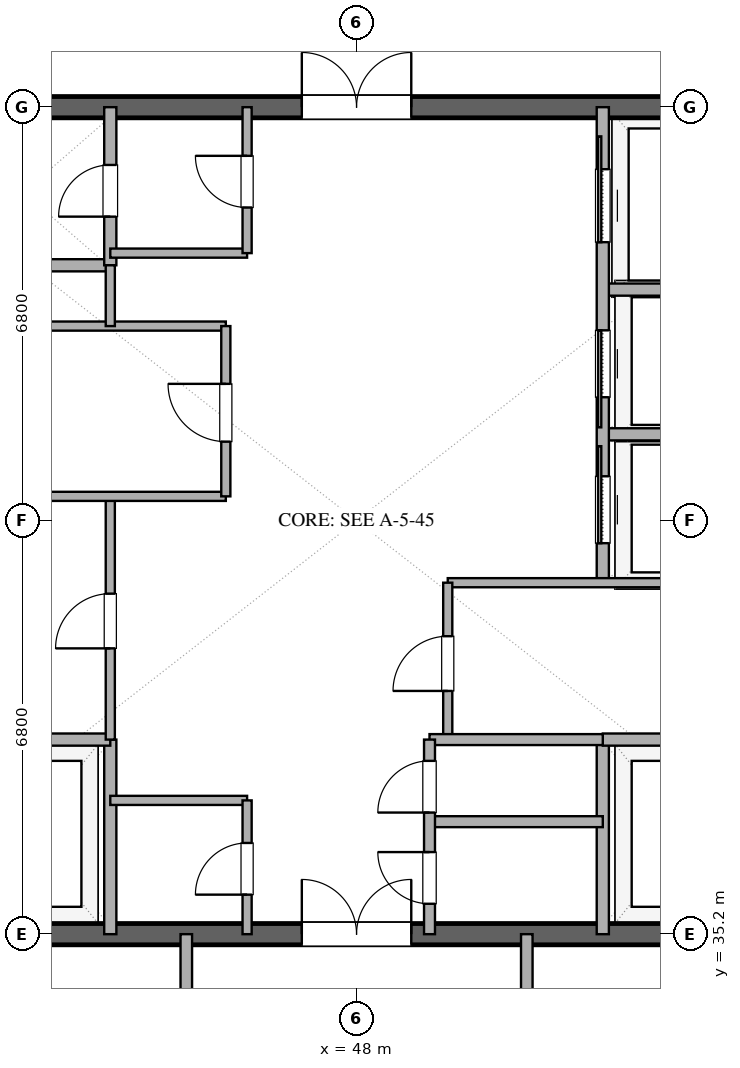
"""IFC4 building model, lengths in metres.
Left out: names, types, materials, properties, quantities, classifications, styles, units other than length and angle.
Written with IfcOpenShell. Run it as: python <this file> out.ifc"""

import sys

from ifc_helpers import new_model, si_unit, direction, frame, frame_2d, origin, place, context, subcontext, project, spatial, rectangle, extrude, element, fill, save


model = new_model("IFC4")
c1 = context("Model", 3, precision=1e-05, world=origin(), true_north=direction((0.0, 1.0)))
c2 = subcontext(c1, "Body", "Model", "MODEL_VIEW")
j1 = project(units=[si_unit("LENGTHUNIT", "METRE"), si_unit("PLANEANGLEUNIT", "RADIAN")], contexts=[c1])
p1 = place(None, origin())
s1 = spatial("IfcSite", under=j1, at=p1, CompositionType="ELEMENT")
p2 = place(p1, origin())
s2 = spatial("IfcBuilding", under=s1, at=p2, CompositionType="ELEMENT")
p3 = place(p2, frame((0.0, 0.0, 309.0)))
s3 = spatial("IfcBuildingStorey", under=s2, at=p3, CompositionType="ELEMENT", Elevation=309.0)
p4 = place(p3, frame((41.0, 35.2, 0.0), z_axis=(0.0, 0.0, 1.0), x_axis=(1.0, 0.0, 0.0)))
e1 = element("IfcWall", 1, at=p4, inside=s3, PredefinedType="SHEAR", context=c2, shape_type="SweptSolid", body=[
    extrude(rectangle(XDim=14.0, YDim=0.35, at=frame_2d((7.0, 0.0))), origin(), (0.0, 0.0, 1.0), 3.37),
])
p5 = place(p4, frame((6.1, 0.0, 0.0)))
e2 = element("IfcOpeningElement", 2, at=p5, cuts=e1, PredefinedType="OPENING", context=c2, shape_type="SweptSolid", body=[
    extrude(rectangle(XDim=1.8, YDim=2.25, at=frame_2d((0.9, 1.125))), frame((0.0, 0.185, 0.0), z_axis=(0.0, -1.0, 0.0), x_axis=(1.0, 0.0, 0.0)), (0.0, 0.0, 1.0), 0.37),
])
p6 = place(p3, frame((41.0, 48.8, 0.0), z_axis=(0.0, 0.0, 1.0), x_axis=(1.0, 0.0, 0.0)))
e3 = element("IfcWall", 3, at=p6, inside=s3, PredefinedType="SHEAR", context=c2, shape_type="SweptSolid", body=[
    extrude(rectangle(XDim=14.0, YDim=0.35, at=frame_2d((7.0, 0.0))), origin(), (0.0, 0.0, 1.0), 3.37),
])
p7 = place(p6, frame((6.1, 0.0, 0.0)))
e4 = element("IfcOpeningElement", 4, at=p7, cuts=e3, PredefinedType="OPENING", context=c2, shape_type="SweptSolid", body=[
    extrude(rectangle(XDim=1.8, YDim=2.25, at=frame_2d((0.9, 1.125))), frame((0.0, 0.185, 0.0), z_axis=(0.0, -1.0, 0.0), x_axis=(1.0, 0.0, 0.0)), (0.0, 0.0, 1.0), 0.37),
])
p8 = place(p3, frame((43.95, 35.2, 0.0), z_axis=(0.0, 0.0, 1.0), x_axis=(0.0, 1.0, 0.0)))
e5 = element("IfcWall", 5, at=p8, inside=s3, PredefinedType="SOLIDWALL", context=c2, shape_type="SweptSolid", body=[
    extrude(rectangle(XDim=3.2, YDim=0.2, at=frame_2d((1.6, 0.0))), origin(), (0.0, 0.0, 1.0), 2.73),
])
p9 = place(p3, frame((41.0, 38.4, 0.0), z_axis=(0.0, 0.0, 1.0), x_axis=(1.0, 0.0, 0.0)))
e6 = element("IfcWall", 6, at=p9, inside=s3, PredefinedType="SOLIDWALL", context=c2, shape_type="SweptSolid", body=[
    extrude(rectangle(XDim=2.95, YDim=0.2, at=frame_2d((1.475, 0.0))), origin(), (0.0, 0.0, 1.0), 2.73),
])
p10 = place(p3, frame((52.05, 35.2, 0.0), z_axis=(0.0, 0.0, 1.0), x_axis=(0.0, 1.0, 0.0)))
e7 = element("IfcWall", 7, at=p10, inside=s3, PredefinedType="SOLIDWALL", context=c2, shape_type="SweptSolid", body=[
    extrude(rectangle(XDim=3.2, YDim=0.2, at=frame_2d((1.6, 0.0))), origin(), (0.0, 0.0, 1.0), 2.73),
])
for number, where, z_axis, x_axis in (
    (8, (52.05, 38.4, 0.0), (0.0, 0.0, 1.0), (1.0, 0.0, 0.0)),
    (9, (41.0, 46.2, 0.0), (0.0, 0.0, 1.0), (1.0, 0.0, 0.0)),
):
    element("IfcWall", number, at=place(p3, frame(where, z_axis=z_axis, x_axis=x_axis)), inside=s3, PredefinedType="SOLIDWALL", context=c2, shape_type="SweptSolid", body=[
        extrude(rectangle(XDim=2.95, YDim=0.2, at=frame_2d((1.475, 0.0))), origin(), (0.0, 0.0, 1.0), 2.73),
    ])
p11 = place(p3, frame((43.95, 46.2, 0.0), z_axis=(0.0, 0.0, 1.0), x_axis=(0.0, 1.0, 0.0)))
e10 = element("IfcWall", 10, at=p11, inside=s3, PredefinedType="SOLIDWALL", context=c2, shape_type="SweptSolid", body=[
    extrude(rectangle(XDim=2.6, YDim=0.2, at=frame_2d((1.3, 0.0))), origin(), (0.0, 0.0, 1.0), 2.73),
])
p12 = place(p11, frame((0.8, 0.0, 0.0)))
e11 = element("IfcOpeningElement", 11, at=p12, cuts=e10, PredefinedType="OPENING", context=c2, shape_type="SweptSolid", body=[
    extrude(rectangle(XDim=0.85, YDim=2.15, at=frame_2d((0.425, 1.075))), frame((0.0, 0.11, 0.0), z_axis=(0.0, -1.0, 0.0), x_axis=(1.0, 0.0, 0.0)), (0.0, 0.0, 1.0), 0.22),
])
p13 = place(p3, frame((43.95, 38.4, 0.0), z_axis=(0.0, 0.0, 1.0), x_axis=(0.0, 1.0, 0.0)))
e12 = element("IfcWall", 12, at=p13, inside=s3, PredefinedType="PARTITIONING", context=c2, shape_type="SweptSolid", body=[
    extrude(rectangle(XDim=4.0, YDim=0.15, at=frame_2d((2.0, 0.0))), origin(), (0.0, 0.0, 1.0), 2.73),
])
p14 = place(p13, frame((1.5, 0.0, 0.0)))
e13 = element("IfcOpeningElement", 13, at=p14, cuts=e12, PredefinedType="OPENING", context=c2, shape_type="SweptSolid", body=[
    extrude(rectangle(XDim=0.9, YDim=2.15, at=frame_2d((0.45, 1.075))), frame((0.0, 0.085, 0.0), z_axis=(0.0, -1.0, 0.0), x_axis=(1.0, 0.0, 0.0)), (0.0, 0.0, 1.0), 0.17),
])
for number, where, z_axis, x_axis in (
    (14, (41.0, 42.4, 0.0), (0.0, 0.0, 1.0), (1.0, 0.0, 0.0)),
    (15, (41.0, 45.2, 0.0), (0.0, 0.0, 1.0), (1.0, 0.0, 0.0)),
):
    element("IfcWall", number, at=place(p3, frame(where, z_axis=z_axis, x_axis=x_axis)), inside=s3, PredefinedType="PARTITIONING", context=c2, shape_type="SweptSolid", body=[
        extrude(rectangle(XDim=4.85, YDim=0.15, at=frame_2d((2.425, 0.0))), origin(), (0.0, 0.0, 1.0), 2.73),
    ])
p15 = place(p3, frame((43.95, 45.2, 0.0), z_axis=(0.0, 0.0, 1.0), x_axis=(0.0, 1.0, 0.0)))
e16 = element("IfcWall", 16, at=p15, inside=s3, PredefinedType="PARTITIONING", context=c2, shape_type="SweptSolid", body=[
    extrude(rectangle(XDim=1.0, YDim=0.15, at=frame_2d((0.5, 0.0))), origin(), (0.0, 0.0, 1.0), 2.73),
])
p16 = place(p3, frame((45.85, 42.4, 0.0), z_axis=(0.0, 0.0, 1.0), x_axis=(0.0, 1.0, 0.0)))
e17 = element("IfcWall", 17, at=p16, inside=s3, PredefinedType="PARTITIONING", context=c2, shape_type="SweptSolid", body=[
    extrude(rectangle(XDim=2.8, YDim=0.15, at=frame_2d((1.4, 0.0))), origin(), (0.0, 0.0, 1.0), 2.73),
])
p17 = place(p16, frame((0.9, 0.0, 0.0)))
e18 = element("IfcOpeningElement", 18, at=p17, cuts=e17, PredefinedType="OPENING", context=c2, shape_type="SweptSolid", body=[
    extrude(rectangle(XDim=0.95, YDim=2.15, at=frame_2d((0.475, 1.075))), frame((0.0, 0.085, 0.0), z_axis=(0.0, -1.0, 0.0), x_axis=(1.0, 0.0, 0.0)), (0.0, 0.0, 1.0), 0.17),
])
for number, where, z_axis, x_axis in (
    (19, (52.05, 43.42, 0.0), (0.0, 0.0, 1.0), (1.0, 0.0, 0.0)),
    (20, (52.05, 45.8, 0.0), (0.0, 0.0, 1.0), (1.0, 0.0, 0.0)),
):
    element("IfcWall", number, at=place(p3, frame(where, z_axis=z_axis, x_axis=x_axis)), inside=s3, PredefinedType="SOLIDWALL", context=c2, shape_type="SweptSolid", body=[
        extrude(rectangle(XDim=2.95, YDim=0.2, at=frame_2d((1.475, 0.0))), origin(), (0.0, 0.0, 1.0), 2.73),
    ])
p18 = place(p3, frame((52.05, 40.98, 0.0), z_axis=(0.0, 0.0, 1.0), x_axis=(0.0, 1.0, 0.0)))
e21 = element("IfcWall", 21, at=p18, inside=s3, PredefinedType="SOLIDWALL", context=c2, shape_type="SweptSolid", body=[
    extrude(rectangle(XDim=7.82, YDim=0.2, at=frame_2d((3.91, 0.0))), origin(), (0.0, 0.0, 1.0), 2.73),
])
p19 = place(p18, frame((0.65, 0.0, 0.0)))
e22 = element("IfcOpeningElement", 22, at=p19, cuts=e21, PredefinedType="OPENING", context=c2, shape_type="SweptSolid", body=[
    extrude(rectangle(XDim=1.1, YDim=2.2, at=frame_2d((0.55, 1.1))), frame((0.0, 0.11, 0.0), z_axis=(0.0, -1.0, 0.0), x_axis=(1.0, 0.0, 0.0)), (0.0, 0.0, 1.0), 0.22),
])
p20 = place(p18, frame((3.05, 0.0, 0.0)))
e23 = element("IfcOpeningElement", 23, at=p20, cuts=e21, PredefinedType="OPENING", context=c2, shape_type="SweptSolid", body=[
    extrude(rectangle(XDim=1.1, YDim=2.2, at=frame_2d((0.55, 1.1))), frame((0.0, 0.11, 0.0), z_axis=(0.0, -1.0, 0.0), x_axis=(1.0, 0.0, 0.0)), (0.0, 0.0, 1.0), 0.22),
])
p21 = place(p18, frame((5.6, 0.0, 0.0)))
e24 = element("IfcOpeningElement", 24, at=p21, cuts=e21, PredefinedType="OPENING", context=c2, shape_type="SweptSolid", body=[
    extrude(rectangle(XDim=1.2, YDim=2.2, at=frame_2d((0.6, 1.1))), frame((0.0, 0.11, 0.0), z_axis=(0.0, -1.0, 0.0), x_axis=(1.0, 0.0, 0.0)), (0.0, 0.0, 1.0), 0.22),
])
p22 = place(p3, frame((49.5, 40.98, 0.0), z_axis=(0.0, 0.0, 1.0), x_axis=(1.0, 0.0, 0.0)))
e25 = element("IfcWall", 25, at=p22, inside=s3, PredefinedType="PARTITIONING", context=c2, shape_type="SweptSolid", body=[
    extrude(rectangle(XDim=5.5, YDim=0.15, at=frame_2d((2.75, 0.0))), origin(), (0.0, 0.0, 1.0), 2.73),
])
p23 = place(p3, frame((49.5, 38.4, 0.0), z_axis=(0.0, 0.0, 1.0), x_axis=(0.0, 1.0, 0.0)))
e26 = element("IfcWall", 26, at=p23, inside=s3, PredefinedType="PARTITIONING", context=c2, shape_type="SweptSolid", body=[
    extrude(rectangle(XDim=2.58, YDim=0.15, at=frame_2d((1.29, 0.0))), origin(), (0.0, 0.0, 1.0), 2.73),
])
p24 = place(p23, frame((0.8, 0.0, 0.0)))
e27 = element("IfcOpeningElement", 27, at=p24, cuts=e26, PredefinedType="OPENING", context=c2, shape_type="SweptSolid", body=[
    extrude(rectangle(XDim=0.9, YDim=2.15, at=frame_2d((0.45, 1.075))), frame((0.0, 0.085, 0.0), z_axis=(0.0, -1.0, 0.0), x_axis=(1.0, 0.0, 0.0)), (0.0, 0.0, 1.0), 0.17),
])
p25 = place(p3, frame((43.95, 37.4, 0.0), z_axis=(0.0, 0.0, 1.0), x_axis=(1.0, 0.0, 0.0)))
e28 = element("IfcWall", 28, at=p25, inside=s3, PredefinedType="PARTITIONING", context=c2, shape_type="SweptSolid", body=[
    extrude(rectangle(XDim=2.25, YDim=0.15, at=frame_2d((1.125, 0.0))), origin(), (0.0, 0.0, 1.0), 2.73),
])
p26 = place(p3, frame((46.2, 35.2, 0.0), z_axis=(0.0, 0.0, 1.0), x_axis=(0.0, 1.0, 0.0)))
e29 = element("IfcWall", 29, at=p26, inside=s3, PredefinedType="PARTITIONING", context=c2, shape_type="SweptSolid", body=[
    extrude(rectangle(XDim=2.2, YDim=0.15, at=frame_2d((1.1, 0.0))), origin(), (0.0, 0.0, 1.0), 2.73),
])
p27 = place(p26, frame((0.65, 0.0, 0.0)))
e30 = element("IfcOpeningElement", 30, at=p27, cuts=e29, PredefinedType="OPENING", context=c2, shape_type="SweptSolid", body=[
    extrude(rectangle(XDim=0.85, YDim=2.15, at=frame_2d((0.425, 1.075))), frame((0.0, 0.085, 0.0), z_axis=(0.0, -1.0, 0.0), x_axis=(1.0, 0.0, 0.0)), (0.0, 0.0, 1.0), 0.17),
])
p28 = place(p3, frame((43.95, 46.4, 0.0), z_axis=(0.0, 0.0, 1.0), x_axis=(1.0, 0.0, 0.0)))
e31 = element("IfcWall", 31, at=p28, inside=s3, PredefinedType="PARTITIONING", context=c2, shape_type="SweptSolid", body=[
    extrude(rectangle(XDim=2.25, YDim=0.15, at=frame_2d((1.125, 0.0))), origin(), (0.0, 0.0, 1.0), 2.73),
])
p29 = place(p3, frame((46.2, 46.4, 0.0), z_axis=(0.0, 0.0, 1.0), x_axis=(0.0, 1.0, 0.0)))
e32 = element("IfcWall", 32, at=p29, inside=s3, PredefinedType="PARTITIONING", context=c2, shape_type="SweptSolid", body=[
    extrude(rectangle(XDim=2.4, YDim=0.15, at=frame_2d((1.2, 0.0))), origin(), (0.0, 0.0, 1.0), 2.73),
])
p30 = place(p29, frame((0.75, 0.0, 0.0)))
e33 = element("IfcOpeningElement", 33, at=p30, cuts=e32, PredefinedType="OPENING", context=c2, shape_type="SweptSolid", body=[
    extrude(rectangle(XDim=0.85, YDim=2.15, at=frame_2d((0.425, 1.075))), frame((0.0, 0.085, 0.0), z_axis=(0.0, -1.0, 0.0), x_axis=(1.0, 0.0, 0.0)), (0.0, 0.0, 1.0), 0.17),
])
for number, where, z_axis, x_axis in (
    (34, (49.2, 37.05, 0.0), (0.0, 0.0, 1.0), (1.0, 0.0, 0.0)),
    (35, (49.2, 38.4, 0.0), (0.0, 0.0, 1.0), (1.0, 0.0, 0.0)),
):
    element("IfcWall", number, at=place(p3, frame(where, z_axis=z_axis, x_axis=x_axis)), inside=s3, PredefinedType="PLUMBINGWALL", context=c2, shape_type="SweptSolid", body=[
        extrude(rectangle(XDim=2.85, YDim=0.18, at=frame_2d((1.425, 0.0))), origin(), (0.0, 0.0, 1.0), 2.73),
    ])
p31 = place(p3, frame((49.2, 35.2, 0.0), z_axis=(0.0, 0.0, 1.0), x_axis=(0.0, 1.0, 0.0)))
e36 = element("IfcWall", 36, at=p31, inside=s3, PredefinedType="PLUMBINGWALL", context=c2, shape_type="SweptSolid", body=[
    extrude(rectangle(XDim=3.2, YDim=0.18, at=frame_2d((1.6, 0.0))), origin(), (0.0, 0.0, 1.0), 2.73),
])
p32 = place(p31, frame((0.5, 0.0, 0.0)))
e37 = element("IfcOpeningElement", 37, at=p32, cuts=e36, PredefinedType="OPENING", context=c2, shape_type="SweptSolid", body=[
    extrude(rectangle(XDim=0.85, YDim=2.1, at=frame_2d((0.425, 1.05))), frame((0.0, 0.1, 0.0), z_axis=(0.0, -1.0, 0.0), x_axis=(1.0, 0.0, 0.0)), (0.0, 0.0, 1.0), 0.2),
])
p33 = place(p31, frame((2.0, 0.0, 0.0)))
e38 = element("IfcOpeningElement", 38, at=p33, cuts=e36, PredefinedType="OPENING", context=c2, shape_type="SweptSolid", body=[
    extrude(rectangle(XDim=0.85, YDim=2.15, at=frame_2d((0.425, 1.075))), frame((0.0, 0.1, 0.0), z_axis=(0.0, -1.0, 0.0), x_axis=(1.0, 0.0, 0.0)), (0.0, 0.0, 1.0), 0.2),
])
for number, where, z_axis, x_axis in (
    (39, (45.2, 33.1, 0.0), (0.0, 0.0, 1.0), (0.0, 1.0, 0.0)),
    (40, (50.8, 35.2, 0.0), (0.0, 0.0, 1.0), (0.0, -1.0, 0.0)),
):
    element("IfcWall", number, at=place(p3, frame(where, z_axis=z_axis, x_axis=x_axis)), inside=s3, PredefinedType="PARTITIONING", context=c2, shape_type="SweptSolid", body=[
        extrude(rectangle(XDim=2.1, YDim=0.19, at=frame_2d((1.05, 0.0))), origin(), (0.0, 0.0, 1.0), 2.73),
    ])
p34 = place(p5, origin())
e41 = element("IfcDoor", 41, at=p34, inside=s3, OperationType="DOUBLE_DOOR_SINGLE_SWING", PredefinedType="DOOR", context=c2, shape_type="SweptSolid", body=[
    extrude(rectangle(XDim=1.8, YDim=2.25, at=frame_2d((0.9, 1.125))), frame((0.0, 0.025, 0.0), z_axis=(0.0, -1.0, 0.0), x_axis=(1.0, 0.0, 0.0)), (0.0, 0.0, 1.0), 0.05),
])
fill(e2, e41)
p35 = place(p7, origin())
e42 = element("IfcDoor", 42, at=p35, inside=s3, OperationType="DOUBLE_DOOR_SINGLE_SWING", PredefinedType="DOOR", context=c2, shape_type="SweptSolid", body=[
    extrude(rectangle(XDim=1.8, YDim=2.25, at=frame_2d((0.9, 1.125))), frame((0.0, 0.025, 0.0), z_axis=(0.0, -1.0, 0.0), x_axis=(1.0, 0.0, 0.0)), (0.0, 0.0, 1.0), 0.05),
])
fill(e4, e42)
p36 = place(p12, origin())
e43 = element("IfcDoor", 43, at=p36, inside=s3, OperationType="SINGLE_SWING_LEFT", PredefinedType="DOOR", context=c2, shape_type="SweptSolid", body=[
    extrude(rectangle(XDim=0.85, YDim=2.15, at=frame_2d((0.425, 1.075))), frame((0.0, 0.025, 0.0), z_axis=(0.0, -1.0, 0.0), x_axis=(1.0, 0.0, 0.0)), (0.0, 0.0, 1.0), 0.05),
])
fill(e11, e43)
p37 = place(p14, origin())
e44 = element("IfcDoor", 44, at=p37, inside=s3, OperationType="SINGLE_SWING_LEFT", PredefinedType="DOOR", context=c2, shape_type="SweptSolid", body=[
    extrude(rectangle(XDim=0.9, YDim=2.15, at=frame_2d((0.45, 1.075))), frame((0.0, 0.025, 0.0), z_axis=(0.0, -1.0, 0.0), x_axis=(1.0, 0.0, 0.0)), (0.0, 0.0, 1.0), 0.05),
])
fill(e13, e44)
p38 = place(p17, origin())
e45 = element("IfcDoor", 45, at=p38, inside=s3, OperationType="SINGLE_SWING_RIGHT", PredefinedType="DOOR", context=c2, shape_type="SweptSolid", body=[
    extrude(rectangle(XDim=0.95, YDim=2.15, at=frame_2d((0.475, 1.075))), frame((0.0, 0.025, 0.0), z_axis=(0.0, -1.0, 0.0), x_axis=(1.0, 0.0, 0.0)), (0.0, 0.0, 1.0), 0.05),
])
fill(e18, e45)
p39 = place(p19, origin())
e46 = element("IfcDoor", 46, at=p39, inside=s3, OperationType="SLIDING_TO_RIGHT", PredefinedType="DOOR", context=c2, shape_type="SweptSolid", body=[
    extrude(rectangle(XDim=1.1, YDim=2.2, at=frame_2d((0.55, 1.1))), frame((0.0, 0.025, 0.0), z_axis=(0.0, -1.0, 0.0), x_axis=(1.0, 0.0, 0.0)), (0.0, 0.0, 1.0), 0.05),
])
fill(e22, e46)
p40 = place(p20, origin())
e47 = element("IfcDoor", 47, at=p40, inside=s3, OperationType="SLIDING_TO_LEFT", PredefinedType="DOOR", context=c2, shape_type="SweptSolid", body=[
    extrude(rectangle(XDim=1.1, YDim=2.2, at=frame_2d((0.55, 1.1))), frame((0.0, 0.025, 0.0), z_axis=(0.0, -1.0, 0.0), x_axis=(1.0, 0.0, 0.0)), (0.0, 0.0, 1.0), 0.05),
])
fill(e23, e47)
p41 = place(p21, origin())
e48 = element("IfcDoor", 48, at=p41, inside=s3, OperationType="SLIDING_TO_RIGHT", PredefinedType="DOOR", context=c2, shape_type="SweptSolid", body=[
    extrude(rectangle(XDim=1.2, YDim=2.2, at=frame_2d((0.6, 1.1))), frame((0.0, 0.025, 0.0), z_axis=(0.0, -1.0, 0.0), x_axis=(1.0, 0.0, 0.0)), (0.0, 0.0, 1.0), 0.05),
])
fill(e24, e48)
p42 = place(p24, origin())
e49 = element("IfcDoor", 49, at=p42, inside=s3, OperationType="SINGLE_SWING_LEFT", PredefinedType="DOOR", context=c2, shape_type="SweptSolid", body=[
    extrude(rectangle(XDim=0.9, YDim=2.15, at=frame_2d((0.45, 1.075))), frame((0.0, 0.025, 0.0), z_axis=(0.0, -1.0, 0.0), x_axis=(1.0, 0.0, 0.0)), (0.0, 0.0, 1.0), 0.05),
])
fill(e27, e49)
p43 = place(p27, origin())
e50 = element("IfcDoor", 50, at=p43, inside=s3, OperationType="SINGLE_SWING_LEFT", PredefinedType="DOOR", context=c2, shape_type="SweptSolid", body=[
    extrude(rectangle(XDim=0.85, YDim=2.15, at=frame_2d((0.425, 1.075))), frame((0.0, 0.025, 0.0), z_axis=(0.0, -1.0, 0.0), x_axis=(1.0, 0.0, 0.0)), (0.0, 0.0, 1.0), 0.05),
])
fill(e30, e50)
p44 = place(p30, origin())
e51 = element("IfcDoor", 51, at=p44, inside=s3, OperationType="SINGLE_SWING_RIGHT", PredefinedType="DOOR", context=c2, shape_type="SweptSolid", body=[
    extrude(rectangle(XDim=0.85, YDim=2.15, at=frame_2d((0.425, 1.075))), frame((0.0, 0.025, 0.0), z_axis=(0.0, -1.0, 0.0), x_axis=(1.0, 0.0, 0.0)), (0.0, 0.0, 1.0), 0.05),
])
fill(e33, e51)
p45 = place(p32, origin())
e52 = element("IfcDoor", 52, at=p45, inside=s3, OperationType="SINGLE_SWING_RIGHT", PredefinedType="DOOR", context=c2, shape_type="SweptSolid", body=[
    extrude(rectangle(XDim=0.85, YDim=2.1, at=frame_2d((0.425, 1.05))), frame((0.0, 0.025, 0.0), z_axis=(0.0, -1.0, 0.0), x_axis=(1.0, 0.0, 0.0)), (0.0, 0.0, 1.0), 0.05),
])
fill(e37, e52)
p46 = place(p33, origin())
e53 = element("IfcDoor", 53, at=p46, inside=s3, OperationType="SINGLE_SWING_LEFT", PredefinedType="DOOR", context=c2, shape_type="SweptSolid", body=[
    extrude(rectangle(XDim=0.85, YDim=2.15, at=frame_2d((0.425, 1.075))), frame((0.0, 0.025, 0.0), z_axis=(0.0, -1.0, 0.0), x_axis=(1.0, 0.0, 0.0)), (0.0, 0.0, 1.0), 0.05),
])
fill(e38, e53)
save(model, sys.argv[1])
